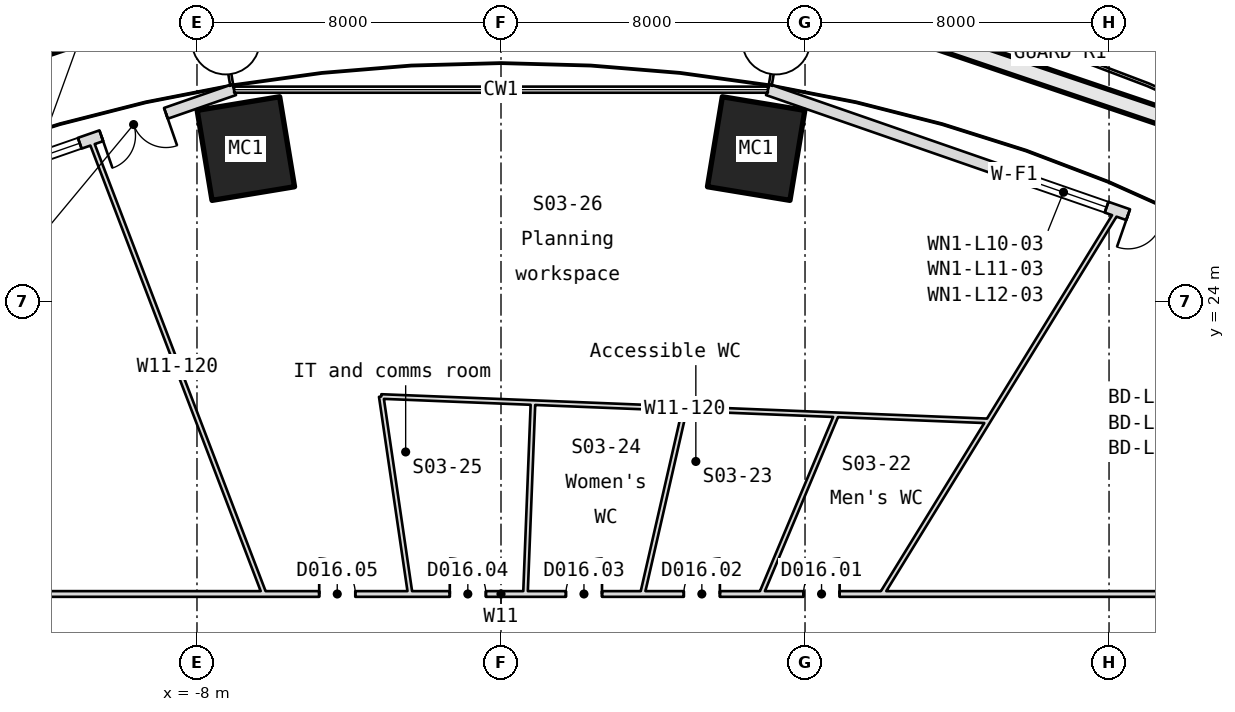
"""IFC4 building model, lengths in metres.
Left out: names, types, materials, properties, quantities, classifications, styles, units other than length and angle.
Written with IfcOpenShell. Run it as: python <this file> out.ifc"""

import sys

from ifc_helpers import new_model, si_unit, direction, frame, frame_2d, origin, origin_2d, place, context, subcontext, project, spatial, rectangle, hollow_rectangle, extrude, element, fill, save


model = new_model("IFC4")
c1 = context("Model", 3, precision=1e-05, world=origin(), true_north=direction((0.0, 1.0)))
c2 = subcontext(c1, "Body", "Model", "MODEL_VIEW")
j1 = project(units=[si_unit("LENGTHUNIT", "METRE"), si_unit("PLANEANGLEUNIT", "RADIAN")], contexts=[c1])
p1 = place(None, origin())
s1 = spatial("IfcSite", under=j1, at=p1, CompositionType="ELEMENT")
p2 = place(p1, origin())
s2 = spatial("IfcBuilding", under=s1, at=p2, CompositionType="ELEMENT")
p3 = place(p2, frame((0.0, 0.0, 57.9)))
s3 = spatial("IfcBuildingStorey", under=s2, at=p3, CompositionType="ELEMENT", Elevation=57.9)
for number, where, z_axis, x_axis in (
    (1, (6.714, 28.02, -0.18), (0.0, 0.0, 1.0), (0.987, -0.163, 0.0)),
    (2, (-6.714, 28.02, -0.18), (0.0, 0.0, 1.0), (0.987, 0.163, 0.0)),
):
    element("IfcColumn", number, at=place(p3, frame(where, z_axis=z_axis, x_axis=x_axis)), inside=s3, PredefinedType="COLUMN", context=c2, shape_type="SweptSolid", body=[
        extrude(hollow_rectangle(XDim=2.2, YDim=2.4, WallThickness=0.09, at=origin_2d()), origin(), (0.0, 0.0, 1.0), 4.15),
    ])
p4 = place(p3, frame((19.998, 25.068, 0.0), z_axis=(0.0, 0.0, 1.0), x_axis=(-0.944762678088, 0.327755216727, 0.0)))
e3 = element("IfcWall", 3, at=p4, inside=s3, PredefinedType="SOLIDWALL", context=c2, shape_type="SweptSolid", body=[
    extrude(rectangle(XDim=13.734, YDim=0.3, at=frame_2d((6.867, 0.0))), origin(), (0.0, 0.0, 1.0), 3.97),
])
p5 = place(p4, frame((1.9, 0.0, 0.0)))
e4 = element("IfcOpeningElement", 4, at=p5, cuts=e3, PredefinedType="OPENING", context=c2, shape_type="SweptSolid", body=[
    extrude(rectangle(XDim=1.8, YDim=2.4, at=frame_2d((0.9, 1.2))), frame((0.0, 0.16, 0.0), z_axis=(0.0, -1.0, 0.0), x_axis=(1.0, 0.0, 0.0)), (0.0, 0.0, 1.0), 0.32),
])
p6 = place(p4, frame((4.3, 0.0, 0.9)))
e5 = element("IfcOpeningElement", 5, at=p6, cuts=e3, PredefinedType="OPENING", context=c2, shape_type="SweptSolid", body=[
    extrude(rectangle(XDim=2.4, YDim=1.5, at=frame_2d((1.2, 0.75))), frame((0.0, 0.16, 0.0), z_axis=(0.0, -1.0, 0.0), x_axis=(1.0, 0.0, 0.0)), (0.0, 0.0, 1.0), 0.32),
])
p7 = place(p3, frame((-7.022, 29.57, 0.0), z_axis=(0.0, 0.0, 1.0), x_axis=(-0.944762678088, -0.327755216727, 0.0)))
e6 = element("IfcWall", 6, at=p7, inside=s3, PredefinedType="SOLIDWALL", context=c2, shape_type="SweptSolid", body=[
    extrude(rectangle(XDim=13.734, YDim=0.3, at=frame_2d((6.867, 0.0))), origin(), (0.0, 0.0, 1.0), 3.97),
])
p8 = place(p7, frame((1.9, 0.0, 0.0)))
e7 = element("IfcOpeningElement", 7, at=p8, cuts=e6, PredefinedType="OPENING", context=c2, shape_type="SweptSolid", body=[
    extrude(rectangle(XDim=1.8, YDim=2.4, at=frame_2d((0.9, 1.2))), frame((0.0, 0.16, 0.0), z_axis=(0.0, -1.0, 0.0), x_axis=(1.0, 0.0, 0.0)), (0.0, 0.0, 1.0), 0.32),
])
p9 = place(p7, frame((4.3, 0.0, 0.9)))
e8 = element("IfcOpeningElement", 8, at=p9, cuts=e6, PredefinedType="OPENING", context=c2, shape_type="SweptSolid", body=[
    extrude(rectangle(XDim=2.4, YDim=1.5, at=frame_2d((1.2, 0.75))), frame((0.0, 0.16, 0.0), z_axis=(0.0, -1.0, 0.0), x_axis=(1.0, 0.0, 0.0)), (0.0, 0.0, 1.0), 0.32),
])
p10 = place(p3, frame((-19.3, 16.3, 0.0), z_axis=(0.0, 0.0, 1.0), x_axis=(1.0, 0.0, 0.0)))
e9 = element("IfcWall", 9, at=p10, inside=s3, PredefinedType="PARTITIONING", context=c2, shape_type="SweptSolid", body=[
    extrude(rectangle(XDim=38.6, YDim=0.15, at=frame_2d((19.3, 0.0))), origin(), (0.0, 0.0, 1.0), 3.97),
])
p11 = place(p10, frame((27.26, 0.0, 0.0)))
e10 = element("IfcOpeningElement", 10, at=p11, cuts=e9, PredefinedType="OPENING", context=c2, shape_type="SweptSolid", body=[
    extrude(rectangle(XDim=0.95, YDim=2.1, at=frame_2d((0.475, 1.05))), frame((0.0, 0.085, 0.0), z_axis=(0.0, -1.0, 0.0), x_axis=(1.0, 0.0, 0.0)), (0.0, 0.0, 1.0), 0.17),
])
p12 = place(p10, frame((24.11, 0.0, 0.0)))
e11 = element("IfcOpeningElement", 11, at=p12, cuts=e9, PredefinedType="OPENING", context=c2, shape_type="SweptSolid", body=[
    extrude(rectangle(XDim=0.95, YDim=2.1, at=frame_2d((0.475, 1.05))), frame((0.0, 0.085, 0.0), z_axis=(0.0, -1.0, 0.0), x_axis=(1.0, 0.0, 0.0)), (0.0, 0.0, 1.0), 0.17),
])
p13 = place(p10, frame((21.008, 0.0, 0.0)))
e12 = element("IfcOpeningElement", 12, at=p13, cuts=e9, PredefinedType="OPENING", context=c2, shape_type="SweptSolid", body=[
    extrude(rectangle(XDim=0.95, YDim=2.1, at=frame_2d((0.475, 1.05))), frame((0.0, 0.085, 0.0), z_axis=(0.0, -1.0, 0.0), x_axis=(1.0, 0.0, 0.0)), (0.0, 0.0, 1.0), 0.17),
])
p14 = place(p10, frame((17.952, 0.0, 0.0)))
e13 = element("IfcOpeningElement", 13, at=p14, cuts=e9, PredefinedType="OPENING", context=c2, shape_type="SweptSolid", body=[
    extrude(rectangle(XDim=0.95, YDim=2.1, at=frame_2d((0.475, 1.05))), frame((0.0, 0.085, 0.0), z_axis=(0.0, -1.0, 0.0), x_axis=(1.0, 0.0, 0.0)), (0.0, 0.0, 1.0), 0.17),
])
p15 = place(p10, frame((14.516, 0.0, 0.0)))
e14 = element("IfcOpeningElement", 14, at=p15, cuts=e9, PredefinedType="OPENING", context=c2, shape_type="SweptSolid", body=[
    extrude(rectangle(XDim=0.95, YDim=2.1, at=frame_2d((0.475, 1.05))), frame((0.0, 0.085, 0.0), z_axis=(0.0, -1.0, 0.0), x_axis=(1.0, 0.0, 0.0)), (0.0, 0.0, 1.0), 0.17),
])
p16 = place(p3, frame((-6.23, 16.3, 0.0), z_axis=(0.0, 0.0, 1.0), x_axis=(-0.357030786406, 0.934092617227, 0.0)))
e15 = element("IfcWall", 15, at=p16, inside=s3, PredefinedType="PARTITIONING", context=c2, shape_type="SweptSolid", body=[
    extrude(rectangle(XDim=12.802, YDim=0.12, at=frame_2d((6.401, 0.0))), origin(), (0.0, 0.0, 1.0), 3.97),
])
p17 = place(p3, frame((-3.151, 21.496, 0.0), z_axis=(0.0, 0.0, 1.0), x_axis=(0.145038947254, -0.989425946587, 0.0)))
e16 = element("IfcWall", 16, at=p17, inside=s3, PredefinedType="PARTITIONING", context=c2, shape_type="SweptSolid", body=[
    extrude(rectangle(XDim=5.252, YDim=0.12, at=frame_2d((2.626, 0.0))), origin(), (0.0, 0.0, 1.0), 3.97),
])
p18 = place(p3, frame((0.842, 21.336, 0.0), z_axis=(0.0, 0.0, 1.0), x_axis=(-0.039434056556, -0.999222175086, 0.0)))
e17 = element("IfcWall", 17, at=p18, inside=s3, PredefinedType="PARTITIONING", context=c2, shape_type="SweptSolid", body=[
    extrude(rectangle(XDim=5.04, YDim=0.12, at=frame_2d((2.52, 0.0))), origin(), (0.0, 0.0, 1.0), 3.97),
])
p19 = place(p3, frame((4.835, 21.175, 0.0), z_axis=(0.0, 0.0, 1.0), x_axis=(-0.222587494033, -0.974912717888, 0.0)))
e18 = element("IfcWall", 18, at=p19, inside=s3, PredefinedType="PARTITIONING", context=c2, shape_type="SweptSolid", body=[
    extrude(rectangle(XDim=5.0, YDim=0.12, at=frame_2d((2.5, 0.0))), origin(), (0.0, 0.0, 1.0), 3.97),
])
p20 = place(p3, frame((8.829, 21.014, 0.0), z_axis=(0.0, 0.0, 1.0), x_axis=(-0.387346118672, -0.921934370956, 0.0)))
e19 = element("IfcWall", 19, at=p20, inside=s3, PredefinedType="PARTITIONING", context=c2, shape_type="SweptSolid", body=[
    extrude(rectangle(XDim=5.114, YDim=0.12, at=frame_2d((2.557, 0.0))), origin(), (0.0, 0.0, 1.0), 3.97),
])
p21 = place(p3, frame((10.022, 16.3, 0.0), z_axis=(0.0, 0.0, 1.0), x_axis=(0.523760062699, 0.851865832583, 0.0)))
e20 = element("IfcWall", 20, at=p21, inside=s3, PredefinedType="PARTITIONING", context=c2, shape_type="SweptSolid", body=[
    extrude(rectangle(XDim=11.832, YDim=0.12, at=frame_2d((5.916, 0.0))), origin(), (0.0, 0.0, 1.0), 3.97),
])
p22 = place(p3, frame((12.822, 20.854, 0.0), z_axis=(0.0, 0.0, 1.0), x_axis=(-0.999192397074, 0.040181508547, 0.0)))
e21 = element("IfcWall", 21, at=p22, inside=s3, PredefinedType="PARTITIONING", context=c2, shape_type="SweptSolid", body=[
    extrude(rectangle(XDim=15.986, YDim=0.12, at=frame_2d((7.993, 0.0))), origin(), (0.0, 0.0, 1.0), 3.97),
])
p23 = place(p5, origin())
e22 = element("IfcDoor", 22, at=p23, inside=s3, OperationType="SINGLE_SWING_LEFT", PredefinedType="DOOR", context=c2, shape_type="SweptSolid", body=[
    extrude(rectangle(XDim=1.8, YDim=2.4, at=frame_2d((0.9, 1.2))), frame((0.0, 0.025, 0.0), z_axis=(0.0, -1.0, 0.0), x_axis=(1.0, 0.0, 0.0)), (0.0, 0.0, 1.0), 0.05),
])
fill(e4, e22)
p24 = place(p6, origin())
e23 = element("IfcWindow", 23, at=p24, inside=s3, PartitioningType="SINGLE_PANEL", PredefinedType="WINDOW", context=c2, shape_type="SweptSolid", body=[
    extrude(rectangle(XDim=2.4, YDim=1.5, at=frame_2d((1.2, 0.75))), frame((0.0, 0.03, 0.0), z_axis=(0.0, -1.0, 0.0), x_axis=(1.0, 0.0, 0.0)), (0.0, 0.0, 1.0), 0.06),
])
fill(e5, e23)
p25 = place(p8, origin())
e24 = element("IfcDoor", 24, at=p25, inside=s3, OperationType="SINGLE_SWING_LEFT", PredefinedType="DOOR", context=c2, shape_type="SweptSolid", body=[
    extrude(rectangle(XDim=1.8, YDim=2.4, at=frame_2d((0.9, 1.2))), frame((0.0, 0.025, 0.0), z_axis=(0.0, -1.0, 0.0), x_axis=(1.0, 0.0, 0.0)), (0.0, 0.0, 1.0), 0.05),
])
fill(e7, e24)
p26 = place(p9, origin())
e25 = element("IfcWindow", 25, at=p26, inside=s3, PartitioningType="SINGLE_PANEL", PredefinedType="WINDOW", context=c2, shape_type="SweptSolid", body=[
    extrude(rectangle(XDim=2.4, YDim=1.5, at=frame_2d((1.2, 0.75))), frame((0.0, 0.03, 0.0), z_axis=(0.0, -1.0, 0.0), x_axis=(1.0, 0.0, 0.0)), (0.0, 0.0, 1.0), 0.06),
])
fill(e8, e25)
p27 = place(p11, origin())
e26 = element("IfcDoor", 26, at=p27, inside=s3, OperationType="SINGLE_SWING_RIGHT", PredefinedType="DOOR", context=c2, shape_type="SweptSolid", body=[
    extrude(rectangle(XDim=0.95, YDim=2.1, at=frame_2d((0.475, 1.05))), frame((0.0, 0.025, 0.0), z_axis=(0.0, -1.0, 0.0), x_axis=(1.0, 0.0, 0.0)), (0.0, 0.0, 1.0), 0.05),
])
fill(e10, e26)
p28 = place(p12, origin())
e27 = element("IfcDoor", 27, at=p28, inside=s3, OperationType="SINGLE_SWING_RIGHT", PredefinedType="DOOR", context=c2, shape_type="SweptSolid", body=[
    extrude(rectangle(XDim=0.95, YDim=2.1, at=frame_2d((0.475, 1.05))), frame((0.0, 0.025, 0.0), z_axis=(0.0, -1.0, 0.0), x_axis=(1.0, 0.0, 0.0)), (0.0, 0.0, 1.0), 0.05),
])
fill(e11, e27)
p29 = place(p13, origin())
e28 = element("IfcDoor", 28, at=p29, inside=s3, OperationType="SINGLE_SWING_RIGHT", PredefinedType="DOOR", context=c2, shape_type="SweptSolid", body=[
    extrude(rectangle(XDim=0.95, YDim=2.1, at=frame_2d((0.475, 1.05))), frame((0.0, 0.025, 0.0), z_axis=(0.0, -1.0, 0.0), x_axis=(1.0, 0.0, 0.0)), (0.0, 0.0, 1.0), 0.05),
])
fill(e12, e28)
p30 = place(p14, origin())
e29 = element("IfcDoor", 29, at=p30, inside=s3, OperationType="SINGLE_SWING_RIGHT", PredefinedType="DOOR", context=c2, shape_type="SweptSolid", body=[
    extrude(rectangle(XDim=0.95, YDim=2.1, at=frame_2d((0.475, 1.05))), frame((0.0, 0.025, 0.0), z_axis=(0.0, -1.0, 0.0), x_axis=(1.0, 0.0, 0.0)), (0.0, 0.0, 1.0), 0.05),
])
fill(e13, e29)
p31 = place(p15, origin())
e30 = element("IfcDoor", 30, at=p31, inside=s3, OperationType="SINGLE_SWING_RIGHT", PredefinedType="DOOR", context=c2, shape_type="SweptSolid", body=[
    extrude(rectangle(XDim=0.95, YDim=2.1, at=frame_2d((0.475, 1.05))), frame((0.0, 0.025, 0.0), z_axis=(0.0, -1.0, 0.0), x_axis=(1.0, 0.0, 0.0)), (0.0, 0.0, 1.0), 0.05),
])
fill(e14, e30)
save(model, sys.argv[1])
